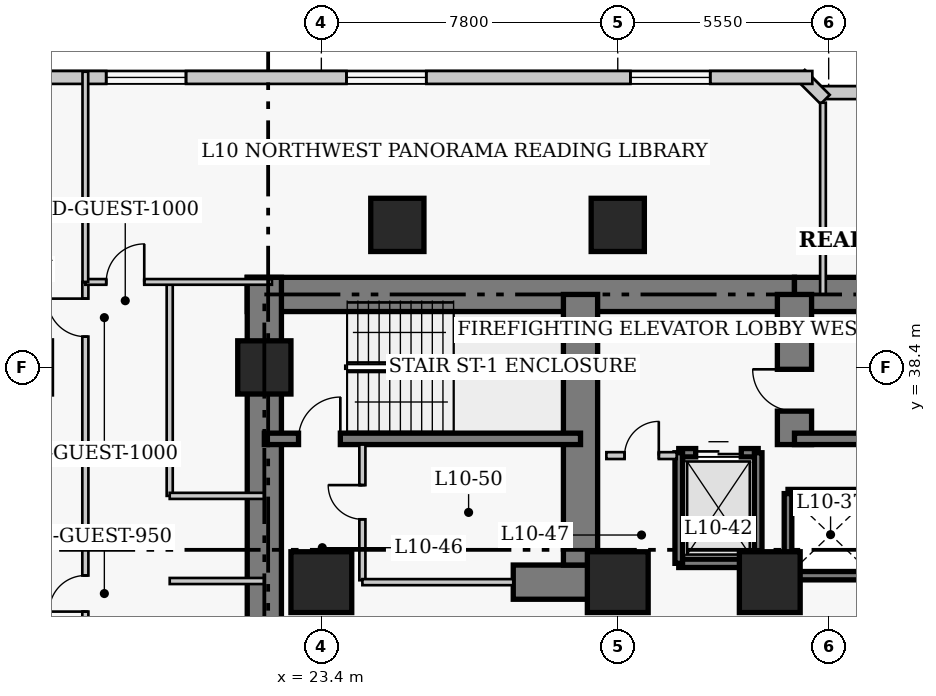
"""IFC4 building model, lengths in metres.
Left out: names, types, materials, properties, quantities, classifications, styles, units other than length and angle.
Written with IfcOpenShell. Run it as: python <this file> out.ifc"""

import sys

from ifc_helpers import new_model, si_unit, direction, frame, frame_2d, origin, origin_2d, place, context, subcontext, project, spatial, rectangle, extrude, element, fill, save


model = new_model("IFC4")
c1 = context("Model", 3, precision=1e-05, world=origin(), true_north=direction((0.0, 1.0)))
c2 = subcontext(c1, "Body", "Model", "MODEL_VIEW")
j1 = project(units=[si_unit("LENGTHUNIT", "METRE"), si_unit("PLANEANGLEUNIT", "RADIAN")], contexts=[c1])
p1 = place(None, origin())
s1 = spatial("IfcSite", under=j1, at=p1, CompositionType="ELEMENT")
p2 = place(p1, origin())
s2 = spatial("IfcBuilding", under=s1, at=p2, CompositionType="ELEMENT")
p3 = place(p2, frame((0.0, 0.0, 45.0)))
s3 = spatial("IfcBuildingStorey", under=s2, at=p3, CompositionType="ELEMENT", Elevation=45.0)
p4 = place(p3, frame((21.45, 40.32, 0.0), z_axis=(0.0, 0.0, 1.0), x_axis=(1.0, 0.0, 0.0)))
e1 = element("IfcWall", 1, at=p4, inside=s3, PredefinedType="SHEAR", context=c2, shape_type="SweptSolid", body=[
    extrude(rectangle(XDim=14.4, YDim=0.9, at=frame_2d((7.2, 0.0))), origin(), (0.0, 0.0, 1.0), 3.8),
])
p5 = place(p3, frame((35.85, 40.32, 0.0), z_axis=(0.0, 0.0, 1.0), x_axis=(1.0, 0.0, 0.0)))
e2 = element("IfcWall", 2, at=p5, inside=s3, PredefinedType="SHEAR", context=c2, shape_type="SweptSolid", body=[
    extrude(rectangle(XDim=12.6, YDim=0.9, at=frame_2d((6.3, 0.0))), origin(), (0.0, 0.0, 1.0), 3.8),
])
p6 = place(p3, frame((21.9, 27.05, 0.0), z_axis=(0.0, 0.0, 1.0), x_axis=(0.0, 1.0, 0.0)))
e3 = element("IfcWall", 3, at=p6, inside=s3, PredefinedType="SHEAR", context=c2, shape_type="SweptSolid", body=[
    extrude(rectangle(XDim=13.72, YDim=0.9, at=frame_2d((6.86, 0.0))), origin(), (0.0, 0.0, 1.0), 3.8),
])
p7 = place(p3, frame((28.45, 32.75, 0.0), z_axis=(0.0, 0.0, 1.0), x_axis=(1.0, 0.0, 0.0)))
e4 = element("IfcWall", 4, at=p7, inside=s3, PredefinedType="SHEAR", context=c2, shape_type="SweptSolid", body=[
    extrude(rectangle(XDim=2.4, YDim=0.9, at=frame_2d((1.2, 0.0))), origin(), (0.0, 0.0, 1.0), 3.8),
])
p8 = place(p3, frame((30.22, 33.2, 0.0), z_axis=(0.0, 0.0, 1.0), x_axis=(0.0, 1.0, 0.0)))
e5 = element("IfcWall", 5, at=p8, inside=s3, PredefinedType="SHEAR", context=c2, shape_type="SweptSolid", body=[
    extrude(rectangle(XDim=7.12, YDim=0.9, at=frame_2d((3.56, 0.0))), origin(), (0.0, 0.0, 1.0), 3.8),
])
p9 = place(p3, frame((35.85, 36.37, 0.0), z_axis=(0.0, 0.0, 1.0), x_axis=(0.0, 1.0, 0.0)))
e6 = element("IfcWall", 6, at=p9, inside=s3, PredefinedType="SHEAR", context=c2, shape_type="SweptSolid", body=[
    extrude(rectangle(XDim=3.95, YDim=0.9, at=frame_2d((1.975, 0.0))), origin(), (0.0, 0.0, 1.0), 3.8),
])
p10 = place(p9, frame((0.88, 0.0, 0.0)))
e7 = element("IfcOpeningElement", 7, at=p10, cuts=e6, PredefinedType="OPENING", context=c2, shape_type="SweptSolid", body=[
    extrude(rectangle(XDim=1.1, YDim=2.15, at=frame_2d((0.55, 1.075))), frame((0.0, 0.46, 0.0), z_axis=(0.0, -1.0, 0.0), x_axis=(1.0, 0.0, 0.0)), (0.0, 0.0, 1.0), 0.92),
])
p11 = place(p3, frame((21.9, 36.52, 0.0), z_axis=(0.0, 0.0, 1.0), x_axis=(1.0, 0.0, 0.0)))
e8 = element("IfcWall", 8, at=p11, inside=s3, PredefinedType="SHEAR", context=c2, shape_type="SweptSolid", body=[
    extrude(rectangle(XDim=8.32, YDim=0.3, at=frame_2d((4.16, 0.0))), origin(), (0.0, 0.0, 1.0), 3.8),
])
p12 = place(p11, frame((0.9, 0.0, 0.0)))
e9 = element("IfcOpeningElement", 9, at=p12, cuts=e8, PredefinedType="OPENING", context=c2, shape_type="SweptSolid", body=[
    extrude(rectangle(XDim=1.1, YDim=2.15, at=frame_2d((0.55, 1.075))), frame((0.0, 0.16, 0.0), z_axis=(0.0, -1.0, 0.0), x_axis=(1.0, 0.0, 0.0)), (0.0, 0.0, 1.0), 0.32),
])
p13 = place(p3, frame((35.85, 36.52, 0.0), z_axis=(0.0, 0.0, 1.0), x_axis=(1.0, 0.0, 0.0)))
e10 = element("IfcWall", 10, at=p13, inside=s3, PredefinedType="SHEAR", context=c2, shape_type="SweptSolid", body=[
    extrude(rectangle(XDim=8.33, YDim=0.3, at=frame_2d((4.165, 0.0))), origin(), (0.0, 0.0, 1.0), 3.8),
])
p14 = place(p3, frame((21.9, 38.4, 0.0), z_axis=(0.0, 0.0, 1.0), x_axis=(1.0, 0.0, 0.0)))
e11 = element("IfcColumn", 11, at=p14, inside=s3, PredefinedType="COLUMN", context=c2, shape_type="SweptSolid", body=[
    extrude(rectangle(XDim=1.4, YDim=1.4, at=origin_2d()), origin(), (0.0, 0.0, 1.0), 3.8),
])
for number, where, z_axis, x_axis in (
    (12, (23.4, 32.75, 0.0), (0.0, 0.0, 1.0), (1.0, 0.0, 0.0)),
    (13, (31.2, 32.75, 0.0), (0.0, 0.0, 1.0), (1.0, 0.0, 0.0)),
    (14, (35.2, 32.75, 0.0), (0.0, 0.0, 1.0), (1.0, 0.0, 0.0)),
):
    element("IfcColumn", number, at=place(p3, frame(where, z_axis=z_axis, x_axis=x_axis)), inside=s3, PredefinedType="COLUMN", context=c2, shape_type="SweptSolid", body=[
        extrude(rectangle(XDim=1.6, YDim=1.6, at=origin_2d()), origin(), (0.0, 0.0, 1.0), 3.8),
    ])
for number, where, z_axis, x_axis in (
    (15, (25.4, 42.15, 0.0), (0.0, 0.0, 1.0), (1.0, 0.0, 0.0)),
    (16, (31.2, 42.15, 0.0), (0.0, 0.0, 1.0), (1.0, 0.0, 0.0)),
):
    element("IfcColumn", number, at=place(p3, frame(where, z_axis=z_axis, x_axis=x_axis)), inside=s3, PredefinedType="COLUMN", context=c2, shape_type="SweptSolid", body=[
        extrude(rectangle(XDim=1.4, YDim=1.4, at=origin_2d()), origin(), (0.0, 0.0, 1.0), 3.8),
    ])
p15 = place(p3, frame((41.42, 45.63, 0.0), z_axis=(0.0, 0.0, 1.0), x_axis=(-1.0, 0.0, 0.0)))
e17 = element("IfcWall", 17, at=p15, inside=s3, PredefinedType="SOLIDWALL", context=c2, shape_type="SweptSolid", body=[
    extrude(rectangle(XDim=4.84, YDim=0.34, at=frame_2d((2.42, 0.0))), origin(), (0.0, 0.0, 1.0), 3.54),
])
p16 = place(p15, frame((1.37, 0.0, 0.85)))
e18 = element("IfcOpeningElement", 18, at=p16, cuts=e17, PredefinedType="OPENING", context=c2, shape_type="SweptSolid", body=[
    extrude(rectangle(XDim=2.1, YDim=1.85, at=frame_2d((1.05, 0.925))), frame((0.0, 0.18, 0.0), z_axis=(0.0, -1.0, 0.0), x_axis=(1.0, 0.0, 0.0)), (0.0, 0.0, 1.0), 0.36),
])
p17 = place(p3, frame((36.658, 45.451, 0.0), z_axis=(0.0, 0.0, 1.0), x_axis=(-0.707106781187, 0.707106781187, 0.0)))
e19 = element("IfcWall", 19, at=p17, inside=s3, PredefinedType="SOLIDWALL", context=c2, shape_type="SweptSolid", body=[
    extrude(rectangle(XDim=0.929, YDim=0.34, at=frame_2d((0.464, 0.0))), origin(), (0.0, 0.0, 1.0), 3.54),
])
p18 = place(p3, frame((36.32, 46.03, 0.0), z_axis=(0.0, 0.0, 1.0), x_axis=(-1.0, 0.0, 0.0)))
e20 = element("IfcWall", 20, at=p18, inside=s3, PredefinedType="SOLIDWALL", context=c2, shape_type="SweptSolid", body=[
    extrude(rectangle(XDim=29.89, YDim=0.34, at=frame_2d((14.945, 0.0))), origin(), (0.0, 0.0, 1.0), 3.54),
])
p19 = place(p18, frame((2.686, 0.0, 0.85)))
e21 = element("IfcOpeningElement", 21, at=p19, cuts=e20, PredefinedType="OPENING", context=c2, shape_type="SweptSolid", body=[
    extrude(rectangle(XDim=2.1, YDim=1.85, at=frame_2d((1.05, 0.925))), frame((0.0, 0.18, 0.0), z_axis=(0.0, -1.0, 0.0), x_axis=(1.0, 0.0, 0.0)), (0.0, 0.0, 1.0), 0.36),
])
p20 = place(p18, frame((10.159, 0.0, 0.85)))
e22 = element("IfcOpeningElement", 22, at=p20, cuts=e20, PredefinedType="OPENING", context=c2, shape_type="SweptSolid", body=[
    extrude(rectangle(XDim=2.1, YDim=1.85, at=frame_2d((1.05, 0.925))), frame((0.0, 0.18, 0.0), z_axis=(0.0, -1.0, 0.0), x_axis=(1.0, 0.0, 0.0)), (0.0, 0.0, 1.0), 0.36),
])
p21 = place(p18, frame((16.481, 0.0, 0.85)))
e23 = element("IfcOpeningElement", 23, at=p21, cuts=e20, PredefinedType="OPENING", context=c2, shape_type="SweptSolid", body=[
    extrude(rectangle(XDim=2.1, YDim=1.85, at=frame_2d((1.05, 0.925))), frame((0.0, 0.18, 0.0), z_axis=(0.0, -1.0, 0.0), x_axis=(1.0, 0.0, 0.0)), (0.0, 0.0, 1.0), 0.36),
])
p22 = place(p18, frame((25.104, 0.0, 0.85)))
e24 = element("IfcOpeningElement", 24, at=p22, cuts=e20, PredefinedType="OPENING", context=c2, shape_type="SweptSolid", body=[
    extrude(rectangle(XDim=2.1, YDim=1.85, at=frame_2d((1.05, 0.925))), frame((0.0, 0.18, 0.0), z_axis=(0.0, -1.0, 0.0), x_axis=(1.0, 0.0, 0.0)), (0.0, 0.0, 1.0), 0.36),
])
for number, where, z_axis, x_axis in (
    (25, (35.68, 35.08, 0.0), (0.0, 0.0, 1.0), (1.0, 0.0, 0.0)),
    (26, (35.68, 32.92, 0.0), (0.0, 0.0, 1.0), (1.0, 0.0, 0.0)),
):
    element("IfcWall", number, at=place(p3, frame(where, z_axis=z_axis, x_axis=x_axis)), inside=s3, PredefinedType="SHEAR", context=c2, shape_type="SweptSolid", body=[
        extrude(rectangle(XDim=2.32, YDim=0.22, at=frame_2d((1.16, 0.0))), origin(), (0.0, 0.0, 1.0), 3.8),
    ])
p23 = place(p3, frame((35.68, 32.92, 0.0), z_axis=(0.0, 0.0, 1.0), x_axis=(0.0, 1.0, 0.0)))
e27 = element("IfcWall", 27, at=p23, inside=s3, PredefinedType="SHEAR", context=c2, shape_type="SweptSolid", body=[
    extrude(rectangle(XDim=2.16, YDim=0.2, at=frame_2d((1.08, 0.0))), origin(), (0.0, 0.0, 1.0), 3.8),
])
p24 = place(p3, frame((32.805, 36.155, 0.0), z_axis=(0.0, 0.0, 1.0), x_axis=(1.0, 0.0, 0.0)))
e28 = element("IfcWall", 28, at=p24, inside=s3, PredefinedType="SHEAR", context=c2, shape_type="SweptSolid", body=[
    extrude(rectangle(XDim=2.09, YDim=0.22, at=frame_2d((1.045, 0.0))), origin(), (0.0, 0.0, 1.0), 3.8),
])
p25 = place(p24, frame((0.445, 0.0, 0.0)))
e29 = element("IfcOpeningElement", 29, at=p25, cuts=e28, PredefinedType="OPENING", context=c2, shape_type="SweptSolid", body=[
    extrude(rectangle(XDim=1.2, YDim=2.15, at=frame_2d((0.6, 1.075))), frame((0.0, 0.12, 0.0), z_axis=(0.0, -1.0, 0.0), x_axis=(1.0, 0.0, 0.0)), (0.0, 0.0, 1.0), 0.24),
])
p26 = place(p3, frame((32.805, 33.245, 0.0), z_axis=(0.0, 0.0, 1.0), x_axis=(1.0, 0.0, 0.0)))
e30 = element("IfcWall", 30, at=p26, inside=s3, PredefinedType="SHEAR", context=c2, shape_type="SweptSolid", body=[
    extrude(rectangle(XDim=2.09, YDim=0.22, at=frame_2d((1.045, 0.0))), origin(), (0.0, 0.0, 1.0), 3.8),
])
for number, where, z_axis, x_axis in (
    (31, (32.805, 33.245, 0.0), (0.0, 0.0, 1.0), (0.0, 1.0, 0.0)),
    (32, (34.895, 33.245, 0.0), (0.0, 0.0, 1.0), (0.0, 1.0, 0.0)),
):
    element("IfcWall", number, at=place(p3, frame(where, z_axis=z_axis, x_axis=x_axis)), inside=s3, PredefinedType="SHEAR", context=c2, shape_type="SweptSolid", body=[
        extrude(rectangle(XDim=2.91, YDim=0.2, at=frame_2d((1.455, 0.0))), origin(), (0.0, 0.0, 1.0), 3.8),
    ])
p27 = place(p3, frame((30.9, 36.08, 0.0), z_axis=(0.0, 0.0, 1.0), x_axis=(1.0, 0.0, 0.0)))
e33 = element("IfcWall", 33, at=p27, inside=s3, PredefinedType="PARTITIONING", context=c2, shape_type="SweptSolid", body=[
    extrude(rectangle(XDim=1.85, YDim=0.18, at=frame_2d((0.925, 0.0))), origin(), (0.0, 0.0, 1.0), 3.54),
])
p28 = place(p27, frame((0.48, 0.0, 0.0)))
e34 = element("IfcOpeningElement", 34, at=p28, cuts=e33, PredefinedType="OPENING", context=c2, shape_type="SweptSolid", body=[
    extrude(rectangle(XDim=0.9, YDim=2.15, at=frame_2d((0.45, 1.075))), frame((0.0, 0.1, 0.0), z_axis=(0.0, -1.0, 0.0), x_axis=(1.0, 0.0, 0.0)), (0.0, 0.0, 1.0), 0.2),
])
p29 = place(p3, frame((24.48, 32.8, 0.0), z_axis=(0.0, 0.0, 1.0), x_axis=(0.0, 1.0, 0.0)))
e35 = element("IfcWall", 35, at=p29, inside=s3, PredefinedType="PARTITIONING", context=c2, shape_type="SweptSolid", body=[
    extrude(rectangle(XDim=3.57, YDim=0.16, at=frame_2d((1.785, 0.0))), origin(), (0.0, 0.0, 1.0), 3.54),
])
p30 = place(p29, frame((1.604, 0.0, 0.0)))
e36 = element("IfcOpeningElement", 36, at=p30, cuts=e35, PredefinedType="OPENING", context=c2, shape_type="SweptSolid", body=[
    extrude(rectangle(XDim=0.9, YDim=2.1, at=frame_2d((0.45, 1.05))), frame((0.0, 0.09, 0.0), z_axis=(0.0, -1.0, 0.0), x_axis=(1.0, 0.0, 0.0)), (0.0, 0.0, 1.0), 0.18),
])
p31 = place(p3, frame((24.48, 32.75, 0.0), z_axis=(0.0, 0.0, 1.0), x_axis=(1.0, 0.0, 0.0)))
e37 = element("IfcWall", 37, at=p31, inside=s3, PredefinedType="PARTITIONING", context=c2, shape_type="SweptSolid", body=[
    extrude(rectangle(XDim=3.97, YDim=0.16, at=frame_2d((1.985, 0.0))), origin(), (0.0, 0.0, 1.0), 3.54),
])
p32 = place(p3, frame((17.19, 5.05, 0.0), z_axis=(0.0, 0.0, 1.0), x_axis=(0.0, 1.0, 0.0)))
e38 = element("IfcWall", 38, at=p32, inside=s3, PredefinedType="PARTITIONING", context=c2, shape_type="SweptSolid", body=[
    extrude(rectangle(XDim=35.6, YDim=0.16, at=frame_2d((17.8, 0.0))), origin(), (0.0, 0.0, 1.0), 3.54),
])
p33 = place(p32, frame((2.6, 0.0, 0.0)))
e39 = element("IfcOpeningElement", 39, at=p33, cuts=e38, PredefinedType="OPENING", context=c2, shape_type="SweptSolid", body=[
    extrude(rectangle(XDim=0.95, YDim=2.1, at=frame_2d((0.475, 1.05))), frame((0.0, 0.09, 0.0), z_axis=(0.0, -1.0, 0.0), x_axis=(1.0, 0.0, 0.0)), (0.0, 0.0, 1.0), 0.18),
])
p34 = place(p32, frame((10.075, 0.0, 0.0)))
e40 = element("IfcOpeningElement", 40, at=p34, cuts=e38, PredefinedType="OPENING", context=c2, shape_type="SweptSolid", body=[
    extrude(rectangle(XDim=0.95, YDim=2.1, at=frame_2d((0.475, 1.05))), frame((0.0, 0.09, 0.0), z_axis=(0.0, -1.0, 0.0), x_axis=(1.0, 0.0, 0.0)), (0.0, 0.0, 1.0), 0.18),
])
p35 = place(p32, frame((18.875, 0.0, 0.0)))
e41 = element("IfcOpeningElement", 41, at=p35, cuts=e38, PredefinedType="OPENING", context=c2, shape_type="SweptSolid", body=[
    extrude(rectangle(XDim=0.95, YDim=2.1, at=frame_2d((0.475, 1.05))), frame((0.0, 0.09, 0.0), z_axis=(0.0, -1.0, 0.0), x_axis=(1.0, 0.0, 0.0)), (0.0, 0.0, 1.0), 0.18),
])
p36 = place(p32, frame((26.925, 0.0, 0.0)))
e42 = element("IfcOpeningElement", 42, at=p36, cuts=e38, PredefinedType="OPENING", context=c2, shape_type="SweptSolid", body=[
    extrude(rectangle(XDim=0.95, YDim=2.1, at=frame_2d((0.475, 1.05))), frame((0.0, 0.09, 0.0), z_axis=(0.0, -1.0, 0.0), x_axis=(1.0, 0.0, 0.0)), (0.0, 0.0, 1.0), 0.18),
])
p37 = place(p32, frame((34.16, 0.0, 0.0)))
e43 = element("IfcOpeningElement", 43, at=p37, cuts=e38, PredefinedType="OPENING", context=c2, shape_type="SweptSolid", body=[
    extrude(rectangle(XDim=1.0, YDim=2.15, at=frame_2d((0.5, 1.075))), frame((0.0, 0.09, 0.0), z_axis=(0.0, -1.0, 0.0), x_axis=(1.0, 0.0, 0.0)), (0.0, 0.0, 1.0), 0.18),
])
p38 = place(p3, frame((19.41, 35.02, 0.0), z_axis=(0.0, 0.0, 1.0), x_axis=(0.0, 1.0, 0.0)))
e44 = element("IfcWall", 44, at=p38, inside=s3, PredefinedType="PARTITIONING", context=c2, shape_type="SweptSolid", body=[
    extrude(rectangle(XDim=5.63, YDim=0.16, at=frame_2d((2.815, 0.0))), origin(), (0.0, 0.0, 1.0), 3.54),
])
for number, where, z_axis, x_axis in (
    (45, (19.41, 35.02, 0.0), (0.0, 0.0, 1.0), (1.0, 0.0, 0.0)),
    (46, (19.41, 32.78, 0.0), (0.0, 0.0, 1.0), (1.0, 0.0, 0.0)),
):
    element("IfcWall", number, at=place(p3, frame(where, z_axis=z_axis, x_axis=x_axis)), inside=s3, PredefinedType="PARTITIONING", context=c2, shape_type="SweptSolid", body=[
        extrude(rectangle(XDim=2.49, YDim=0.16, at=frame_2d((1.245, 0.0))), origin(), (0.0, 0.0, 1.0), 3.54),
    ])
p39 = place(p3, frame((17.19, 40.65, 0.0), z_axis=(0.0, 0.0, 1.0), x_axis=(1.0, 0.0, 0.0)))
e47 = element("IfcWall", 47, at=p39, inside=s3, PredefinedType="PARTITIONING", context=c2, shape_type="SweptSolid", body=[
    extrude(rectangle(XDim=4.91, YDim=0.15, at=frame_2d((2.455, 0.0))), origin(), (0.0, 0.0, 1.0), 3.54),
])
p40 = place(p39, frame((0.55, 0.0, 0.0)))
e48 = element("IfcOpeningElement", 48, at=p40, cuts=e47, PredefinedType="OPENING", context=c2, shape_type="SweptSolid", body=[
    extrude(rectangle(XDim=1.0, YDim=2.15, at=frame_2d((0.5, 1.075))), frame((0.0, 0.085, 0.0), z_axis=(0.0, -1.0, 0.0), x_axis=(1.0, 0.0, 0.0)), (0.0, 0.0, 1.0), 0.17),
])
p41 = place(p3, frame((17.19, 40.65, 0.0), z_axis=(0.0, 0.0, 1.0), x_axis=(0.0, 1.0, 0.0)))
e49 = element("IfcWall", 49, at=p41, inside=s3, PredefinedType="PARTITIONING", context=c2, shape_type="SweptSolid", body=[
    extrude(rectangle(XDim=5.53, YDim=0.15, at=frame_2d((2.765, 0.0))), origin(), (0.0, 0.0, 1.0), 3.54),
])
p42 = place(p3, frame((36.6, 40.32, 0.0), z_axis=(0.0, 0.0, 1.0), x_axis=(0.0, 1.0, 0.0)))
e50 = element("IfcWall", 50, at=p42, inside=s3, PredefinedType="PARTITIONING", context=c2, shape_type="SweptSolid", body=[
    extrude(rectangle(XDim=5.045, YDim=0.15, at=frame_2d((2.522, 0.0))), origin(), (0.0, 0.0, 1.0), 3.54),
])
p43 = place(p3, frame((14.45, 36.1, 0.0), z_axis=(0.0, 0.0, 1.0), x_axis=(1.0, 0.0, 0.0)))
e51 = element("IfcWall", 51, at=p43, inside=s3, PredefinedType="PARTITIONING", context=c2, shape_type="SweptSolid", body=[
    extrude(rectangle(XDim=2.74, YDim=0.15, at=frame_2d((1.37, 0.0))), origin(), (0.0, 0.0, 1.0), 3.54),
])
p44 = place(p19, origin())
e52 = element("IfcWindow", 52, at=p44, inside=s3, PartitioningType="SINGLE_PANEL", PredefinedType="WINDOW", context=c2, shape_type="SweptSolid", body=[
    extrude(rectangle(XDim=2.1, YDim=1.85, at=frame_2d((1.05, 0.925))), frame((0.0, 0.03, 0.0), z_axis=(0.0, -1.0, 0.0), x_axis=(1.0, 0.0, 0.0)), (0.0, 0.0, 1.0), 0.06),
])
fill(e21, e52)
p45 = place(p20, origin())
e53 = element("IfcWindow", 53, at=p45, inside=s3, PartitioningType="SINGLE_PANEL", PredefinedType="WINDOW", context=c2, shape_type="SweptSolid", body=[
    extrude(rectangle(XDim=2.1, YDim=1.85, at=frame_2d((1.05, 0.925))), frame((0.0, 0.03, 0.0), z_axis=(0.0, -1.0, 0.0), x_axis=(1.0, 0.0, 0.0)), (0.0, 0.0, 1.0), 0.06),
])
fill(e22, e53)
p46 = place(p21, origin())
e54 = element("IfcWindow", 54, at=p46, inside=s3, PartitioningType="SINGLE_PANEL", PredefinedType="WINDOW", context=c2, shape_type="SweptSolid", body=[
    extrude(rectangle(XDim=2.1, YDim=1.85, at=frame_2d((1.05, 0.925))), frame((0.0, 0.03, 0.0), z_axis=(0.0, -1.0, 0.0), x_axis=(1.0, 0.0, 0.0)), (0.0, 0.0, 1.0), 0.06),
])
fill(e23, e54)
p47 = place(p25, origin())
e55 = element("IfcDoor", 55, at=p47, inside=s3, OperationType="DOUBLE_DOOR_SLIDING", PredefinedType="DOOR", context=c2, shape_type="SweptSolid", body=[
    extrude(rectangle(XDim=1.2, YDim=2.15, at=frame_2d((0.6, 1.075))), frame((0.0, 0.025, 0.0), z_axis=(0.0, -1.0, 0.0), x_axis=(1.0, 0.0, 0.0)), (0.0, 0.0, 1.0), 0.05),
])
fill(e29, e55)
p48 = place(p28, origin())
e56 = element("IfcDoor", 56, at=p48, inside=s3, OperationType="SINGLE_SWING_RIGHT", PredefinedType="DOOR", context=c2, shape_type="SweptSolid", body=[
    extrude(rectangle(XDim=0.9, YDim=2.15, at=frame_2d((0.45, 1.075))), frame((0.0, 0.025, 0.0), z_axis=(0.0, -1.0, 0.0), x_axis=(1.0, 0.0, 0.0)), (0.0, 0.0, 1.0), 0.05),
])
fill(e34, e56)
p49 = place(p30, origin())
e57 = element("IfcDoor", 57, at=p49, inside=s3, OperationType="SINGLE_SWING_RIGHT", PredefinedType="DOOR", context=c2, shape_type="SweptSolid", body=[
    extrude(rectangle(XDim=0.9, YDim=2.1, at=frame_2d((0.45, 1.05))), frame((0.0, 0.025, 0.0), z_axis=(0.0, -1.0, 0.0), x_axis=(1.0, 0.0, 0.0)), (0.0, 0.0, 1.0), 0.05),
])
fill(e36, e57)
p50 = place(p40, origin())
e58 = element("IfcDoor", 58, at=p50, inside=s3, OperationType="SINGLE_SWING_RIGHT", PredefinedType="DOOR", context=c2, shape_type="SweptSolid", body=[
    extrude(rectangle(XDim=1.0, YDim=2.15, at=frame_2d((0.5, 1.075))), frame((0.0, 0.025, 0.0), z_axis=(0.0, -1.0, 0.0), x_axis=(1.0, 0.0, 0.0)), (0.0, 0.0, 1.0), 0.05),
])
fill(e48, e58)
p51 = place(p36, origin())
e59 = element("IfcDoor", 59, at=p51, inside=s3, OperationType="SINGLE_SWING_LEFT", PredefinedType="DOOR", context=c2, shape_type="SweptSolid", body=[
    extrude(rectangle(XDim=0.95, YDim=2.1, at=frame_2d((0.475, 1.05))), frame((0.0, 0.025, 0.0), z_axis=(0.0, -1.0, 0.0), x_axis=(1.0, 0.0, 0.0)), (0.0, 0.0, 1.0), 0.05),
])
fill(e42, e59)
p52 = place(p37, origin())
e60 = element("IfcDoor", 60, at=p52, inside=s3, OperationType="SINGLE_SWING_RIGHT", PredefinedType="DOOR", context=c2, shape_type="SweptSolid", body=[
    extrude(rectangle(XDim=1.0, YDim=2.15, at=frame_2d((0.5, 1.075))), frame((0.0, 0.025, 0.0), z_axis=(0.0, -1.0, 0.0), x_axis=(1.0, 0.0, 0.0)), (0.0, 0.0, 1.0), 0.05),
])
fill(e43, e60)
p53 = place(p12, origin())
e61 = element("IfcDoor", 61, at=p53, inside=s3, OperationType="SINGLE_SWING_RIGHT", PredefinedType="DOOR", context=c2, shape_type="SweptSolid", body=[
    extrude(rectangle(XDim=1.1, YDim=2.15, at=frame_2d((0.55, 1.075))), frame((0.0, 0.025, 0.0), z_axis=(0.0, -1.0, 0.0), x_axis=(1.0, 0.0, 0.0)), (0.0, 0.0, 1.0), 0.05),
])
fill(e9, e61)
p54 = place(p10, origin())
e62 = element("IfcDoor", 62, at=p54, inside=s3, OperationType="SINGLE_SWING_RIGHT", PredefinedType="DOOR", context=c2, shape_type="SweptSolid", body=[
    extrude(rectangle(XDim=1.1, YDim=2.15, at=frame_2d((0.55, 1.075))), frame((0.0, 0.025, 0.0), z_axis=(0.0, -1.0, 0.0), x_axis=(1.0, 0.0, 0.0)), (0.0, 0.0, 1.0), 0.05),
])
fill(e7, e62)
save(model, sys.argv[1])
